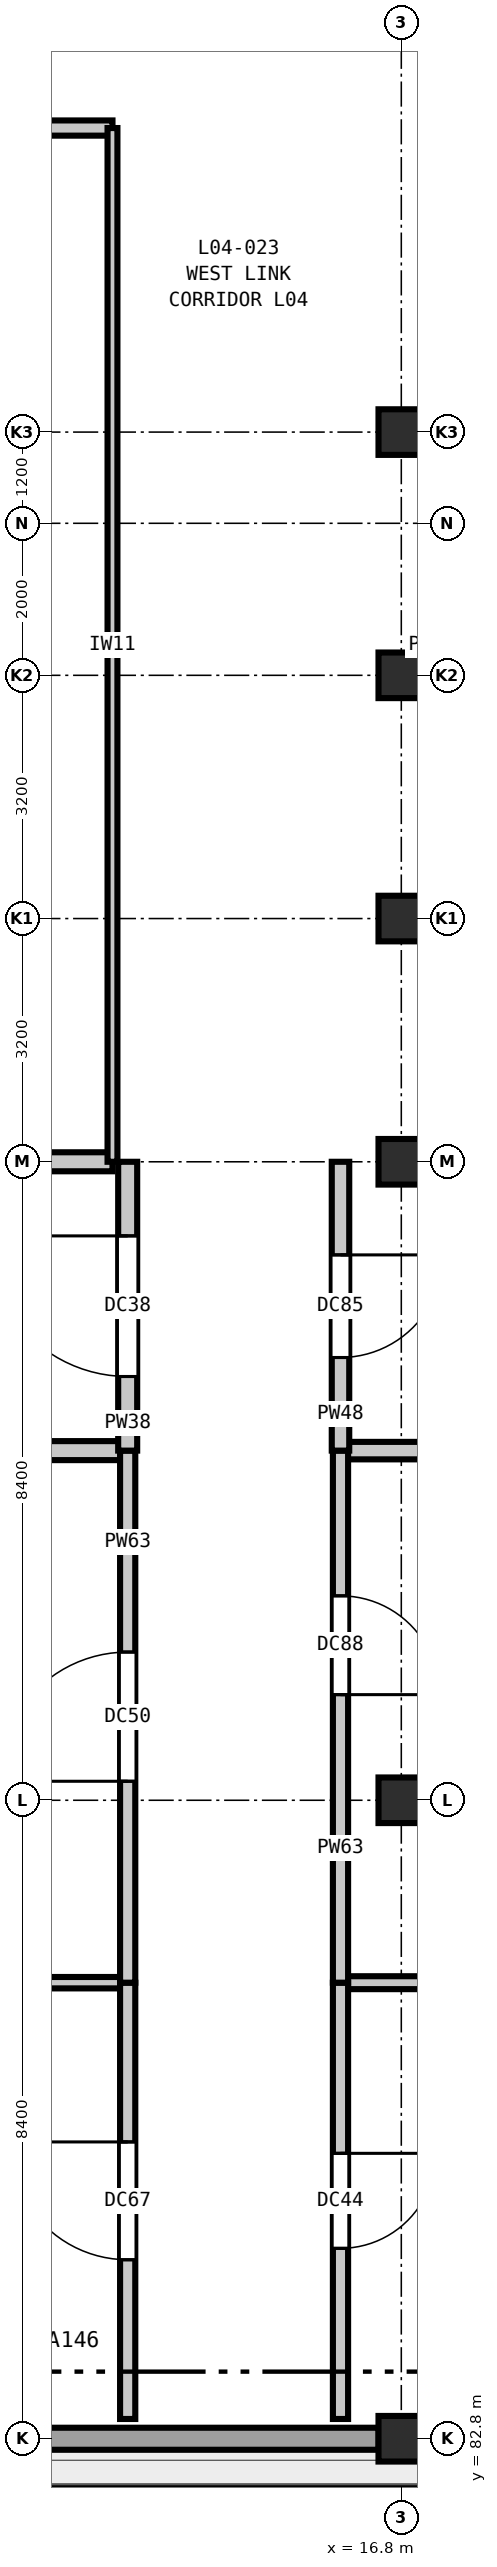
"""IFC4 building model, lengths in metres.
Left out: names, types, materials, properties, quantities, classifications, styles, units other than length and angle.
Written with IfcOpenShell. Run it as: python <this file> out.ifc"""

import sys

from ifc_helpers import new_model, si_unit, direction, frame, frame_2d, origin, origin_2d, place, context, subcontext, project, spatial, rectangle, extrude, element, fill, save


model = new_model("IFC4")
c1 = context("Model", 3, precision=1e-05, world=origin(), true_north=direction((0.0, 1.0)))
c2 = subcontext(c1, "Body", "Model", "MODEL_VIEW")
j1 = project(units=[si_unit("LENGTHUNIT", "METRE"), si_unit("PLANEANGLEUNIT", "RADIAN")], contexts=[c1])
p1 = place(None, origin())
s1 = spatial("IfcSite", under=j1, at=p1, CompositionType="ELEMENT")
p2 = place(p1, origin())
s2 = spatial("IfcBuilding", under=s1, at=p2, CompositionType="ELEMENT")
p3 = place(p2, frame((0.0, 0.0, 20.4)))
s3 = spatial("IfcBuildingStorey", under=s2, at=p3, CompositionType="ELEMENT", Elevation=20.4)
for number, where, z_axis, x_axis in (
    (1, (16.8, 82.8, 0.0), (0.0, 0.0, 1.0), (1.0, 0.0, 0.0)),
    (2, (16.8, 91.2, 0.0), (0.0, 0.0, 1.0), (1.0, 0.0, 0.0)),
    (3, (16.8, 99.6, 0.0), (0.0, 0.0, 1.0), (1.0, 0.0, 0.0)),
    (4, (16.8, 102.8, 0.0), (0.0, 0.0, 1.0), (1.0, 0.0, 0.0)),
    (5, (16.8, 106.0, 0.0), (0.0, 0.0, 1.0), (1.0, 0.0, 0.0)),
    (6, (16.8, 109.2, 0.0), (0.0, 0.0, 1.0), (1.0, 0.0, 0.0)),
):
    element("IfcColumn", number, at=place(p3, frame(where, z_axis=z_axis, x_axis=x_axis)), inside=s3, PredefinedType="COLUMN", context=c2, shape_type="SweptSolid", body=[
        extrude(rectangle(XDim=0.6, YDim=0.6, at=origin_2d()), origin(), (0.0, 0.0, 1.0), 4.2),
    ])
p4 = place(p3, frame((16.502, 82.8, 0.0), z_axis=(0.0, 0.0, 1.0), x_axis=(-1.0, 0.0, 0.0)))
e7 = element("IfcWall", 7, at=p4, inside=s3, PredefinedType="SOLIDWALL", context=c2, shape_type="SweptSolid", body=[
    extrude(rectangle(XDim=7.804, YDim=0.29, at=frame_2d((3.902, 0.0))), origin(), (0.0, 0.0, 1.0), 3.48),
])
p5 = place(p3, frame((0.26, 88.8, 0.0), z_axis=(0.0, 0.0, 1.0), x_axis=(1.0, 0.0, 0.0)))
e8 = element("IfcWall", 8, at=p5, inside=s3, PredefinedType="PARTITIONING", context=c2, shape_type="SweptSolid", body=[
    extrude(rectangle(XDim=12.94, YDim=0.15, at=frame_2d((6.47, 0.0))), origin(), (0.0, 0.0, 1.0), 3.82),
])
p6 = place(p3, frame((16.0, 88.8, 0.0), z_axis=(0.0, 0.0, 1.0), x_axis=(1.0, 0.0, 0.0)))
e9 = element("IfcWall", 9, at=p6, inside=s3, PredefinedType="PARTITIONING", context=c2, shape_type="SweptSolid", body=[
    extrude(rectangle(XDim=8.94, YDim=0.17, at=frame_2d((4.47, 0.0))), origin(), (0.0, 0.0, 1.0), 3.82),
])
p7 = place(p3, frame((0.26, 95.8, 0.0), z_axis=(0.0, 0.0, 1.0), x_axis=(1.0, 0.0, 0.0)))
e10 = element("IfcWall", 10, at=p7, inside=s3, PredefinedType="PARTITIONING", context=c2, shape_type="SweptSolid", body=[
    extrude(rectangle(XDim=12.94, YDim=0.25, at=frame_2d((6.47, 0.0))), origin(), (0.0, 0.0, 1.0), 3.82),
])
p8 = place(p3, frame((16.0, 95.8, 0.0), z_axis=(0.0, 0.0, 1.0), x_axis=(1.0, 0.0, 0.0)))
e11 = element("IfcWall", 11, at=p8, inside=s3, PredefinedType="PARTITIONING", context=c2, shape_type="SweptSolid", body=[
    extrude(rectangle(XDim=8.94, YDim=0.23, at=frame_2d((4.47, 0.0))), origin(), (0.0, 0.0, 1.0), 3.82),
])
p9 = place(p3, frame((8.715, 99.6, 0.0), z_axis=(0.0, 0.0, 1.0), x_axis=(1.0, 0.0, 0.0)))
e12 = element("IfcWall", 12, at=p9, inside=s3, PredefinedType="PARTITIONING", context=c2, shape_type="SweptSolid", body=[
    extrude(rectangle(XDim=4.285, YDim=0.25, at=frame_2d((2.143, 0.0))), origin(), (0.0, 0.0, 1.0), 3.585),
])
p10 = place(p3, frame((6.0, 113.2, 0.0), z_axis=(0.0, 0.0, 1.0), x_axis=(1.0, 0.0, 0.0)))
e13 = element("IfcWall", 13, at=p10, inside=s3, PredefinedType="PARTITIONING", context=c2, shape_type="SweptSolid", body=[
    extrude(rectangle(XDim=7.0, YDim=0.2, at=frame_2d((3.5, 0.0))), origin(), (0.0, 0.0, 1.0), 3.82),
])
p11 = place(p10, frame((2.775, 0.0, 0.0)))
e14 = element("IfcOpeningElement", 14, at=p11, cuts=e13, PredefinedType="OPENING", context=c2, shape_type="SweptSolid", body=[
    extrude(rectangle(XDim=1.45, YDim=2.25, at=frame_2d((0.725, 1.125))), frame((0.0, 0.11, 0.0), z_axis=(0.0, -1.0, 0.0), x_axis=(1.0, 0.0, 0.0)), (0.0, 0.0, 1.0), 0.22),
])
p12 = place(p3, frame((13.0, 99.6, 0.0), z_axis=(0.0, 0.0, 1.0), x_axis=(0.0, 1.0, 0.0)))
e15 = element("IfcWall", 15, at=p12, inside=s3, PredefinedType="PARTITIONING", context=c2, shape_type="SweptSolid", body=[
    extrude(rectangle(XDim=13.6, YDim=0.13, at=frame_2d((6.8, 0.0))), origin(), (0.0, 0.0, 1.0), 3.82),
])
p13 = place(p3, frame((13.2, 83.06, 0.0), z_axis=(0.0, 0.0, 1.0), x_axis=(0.0, 1.0, 0.0)))
e16 = element("IfcWall", 16, at=p13, inside=s3, PredefinedType="PARTITIONING", context=c2, shape_type="SweptSolid", body=[
    extrude(rectangle(XDim=5.74, YDim=0.2, at=frame_2d((2.87, 0.0))), origin(), (0.0, 0.0, 1.0), 3.82),
])
p14 = place(p13, frame((2.095, 0.0, 0.0)))
e17 = element("IfcOpeningElement", 17, at=p14, cuts=e16, PredefinedType="OPENING", context=c2, shape_type="SweptSolid", body=[
    extrude(rectangle(XDim=1.55, YDim=2.25, at=frame_2d((0.775, 1.125))), frame((0.0, 0.11, 0.0), z_axis=(0.0, -1.0, 0.0), x_axis=(1.0, 0.0, 0.0)), (0.0, 0.0, 1.0), 0.22),
])
p15 = place(p3, frame((13.2, 88.8, 0.0), z_axis=(0.0, 0.0, 1.0), x_axis=(0.0, 1.0, 0.0)))
e18 = element("IfcWall", 18, at=p15, inside=s3, PredefinedType="PARTITIONING", context=c2, shape_type="SweptSolid", body=[
    extrude(rectangle(XDim=7.0, YDim=0.2, at=frame_2d((3.5, 0.0))), origin(), (0.0, 0.0, 1.0), 3.82),
])
p16 = place(p15, frame((2.65, 0.0, 0.0)))
e19 = element("IfcOpeningElement", 19, at=p16, cuts=e18, PredefinedType="OPENING", context=c2, shape_type="SweptSolid", body=[
    extrude(rectangle(XDim=1.7, YDim=2.3, at=frame_2d((0.85, 1.15))), frame((0.0, 0.11, 0.0), z_axis=(0.0, -1.0, 0.0), x_axis=(1.0, 0.0, 0.0)), (0.0, 0.0, 1.0), 0.22),
])
p17 = place(p3, frame((13.2, 95.8, 0.0), z_axis=(0.0, 0.0, 1.0), x_axis=(0.0, 1.0, 0.0)))
e20 = element("IfcWall", 20, at=p17, inside=s3, PredefinedType="PARTITIONING", context=c2, shape_type="SweptSolid", body=[
    extrude(rectangle(XDim=3.8, YDim=0.25, at=frame_2d((1.9, 0.0))), origin(), (0.0, 0.0, 1.0), 3.82),
])
p18 = place(p17, frame((0.975, 0.0, 0.0)))
e21 = element("IfcOpeningElement", 21, at=p18, cuts=e20, PredefinedType="OPENING", context=c2, shape_type="SweptSolid", body=[
    extrude(rectangle(XDim=1.85, YDim=2.3, at=frame_2d((0.925, 1.15))), frame((0.0, 0.135, 0.0), z_axis=(0.0, -1.0, 0.0), x_axis=(1.0, 0.0, 0.0)), (0.0, 0.0, 1.0), 0.27),
])
p19 = place(p3, frame((16.0, 83.06, 0.0), z_axis=(0.0, 0.0, 1.0), x_axis=(0.0, 1.0, 0.0)))
e22 = element("IfcWall", 22, at=p19, inside=s3, PredefinedType="PARTITIONING", context=c2, shape_type="SweptSolid", body=[
    extrude(rectangle(XDim=5.74, YDim=0.2, at=frame_2d((2.87, 0.0))), origin(), (0.0, 0.0, 1.0), 3.82),
])
p20 = place(p19, frame((2.245, 0.0, 0.0)))
e23 = element("IfcOpeningElement", 23, at=p20, cuts=e22, PredefinedType="OPENING", context=c2, shape_type="SweptSolid", body=[
    extrude(rectangle(XDim=1.25, YDim=2.15, at=frame_2d((0.625, 1.075))), frame((0.0, 0.11, 0.0), z_axis=(0.0, -1.0, 0.0), x_axis=(1.0, 0.0, 0.0)), (0.0, 0.0, 1.0), 0.22),
])
p21 = place(p3, frame((16.0, 88.8, 0.0), z_axis=(0.0, 0.0, 1.0), x_axis=(0.0, 1.0, 0.0)))
e24 = element("IfcWall", 24, at=p21, inside=s3, PredefinedType="PARTITIONING", context=c2, shape_type="SweptSolid", body=[
    extrude(rectangle(XDim=7.0, YDim=0.2, at=frame_2d((3.5, 0.0))), origin(), (0.0, 0.0, 1.0), 3.82),
])
p22 = place(p21, frame((3.79, 0.0, 0.0)))
e25 = element("IfcOpeningElement", 25, at=p22, cuts=e24, PredefinedType="OPENING", context=c2, shape_type="SweptSolid", body=[
    extrude(rectangle(XDim=1.3, YDim=2.2, at=frame_2d((0.65, 1.1))), frame((0.0, 0.11, 0.0), z_axis=(0.0, -1.0, 0.0), x_axis=(1.0, 0.0, 0.0)), (0.0, 0.0, 1.0), 0.22),
])
p23 = place(p3, frame((16.0, 95.8, 0.0), z_axis=(0.0, 0.0, 1.0), x_axis=(0.0, 1.0, 0.0)))
e26 = element("IfcWall", 26, at=p23, inside=s3, PredefinedType="PARTITIONING", context=c2, shape_type="SweptSolid", body=[
    extrude(rectangle(XDim=3.8, YDim=0.23, at=frame_2d((1.9, 0.0))), origin(), (0.0, 0.0, 1.0), 3.82),
])
p24 = place(p23, frame((1.225, 0.0, 0.0)))
e27 = element("IfcOpeningElement", 27, at=p24, cuts=e26, PredefinedType="OPENING", context=c2, shape_type="SweptSolid", body=[
    extrude(rectangle(XDim=1.35, YDim=2.2, at=frame_2d((0.675, 1.1))), frame((0.0, 0.125, 0.0), z_axis=(0.0, -1.0, 0.0), x_axis=(1.0, 0.0, 0.0)), (0.0, 0.0, 1.0), 0.25),
])
p25 = place(p14, origin())
e28 = element("IfcDoor", 28, at=p25, inside=s3, OperationType="SINGLE_SWING_RIGHT", PredefinedType="DOOR", context=c2, shape_type="SweptSolid", body=[
    extrude(rectangle(XDim=1.55, YDim=2.25, at=frame_2d((0.775, 1.125))), frame((0.0, 0.025, 0.0), z_axis=(0.0, -1.0, 0.0), x_axis=(1.0, 0.0, 0.0)), (0.0, 0.0, 1.0), 0.05),
])
fill(e17, e28)
p26 = place(p16, origin())
e29 = element("IfcDoor", 29, at=p26, inside=s3, OperationType="SINGLE_SWING_LEFT", PredefinedType="DOOR", context=c2, shape_type="SweptSolid", body=[
    extrude(rectangle(XDim=1.7, YDim=2.3, at=frame_2d((0.85, 1.15))), frame((0.0, 0.025, 0.0), z_axis=(0.0, -1.0, 0.0), x_axis=(1.0, 0.0, 0.0)), (0.0, 0.0, 1.0), 0.05),
])
fill(e19, e29)
p27 = place(p18, origin())
e30 = element("IfcDoor", 30, at=p27, inside=s3, OperationType="SINGLE_SWING_RIGHT", PredefinedType="DOOR", context=c2, shape_type="SweptSolid", body=[
    extrude(rectangle(XDim=1.85, YDim=2.3, at=frame_2d((0.925, 1.15))), frame((0.0, 0.025, 0.0), z_axis=(0.0, -1.0, 0.0), x_axis=(1.0, 0.0, 0.0)), (0.0, 0.0, 1.0), 0.05),
])
fill(e21, e30)
p28 = place(p20, frame((1.25, 0.0, 0.0), z_axis=(0.0, 0.0, 1.0), x_axis=(-1.0, 0.0, 0.0)))
e31 = element("IfcDoor", 31, at=p28, inside=s3, OperationType="SINGLE_SWING_LEFT", PredefinedType="DOOR", context=c2, shape_type="SweptSolid", body=[
    extrude(rectangle(XDim=1.25, YDim=2.15, at=frame_2d((0.625, 1.075))), frame((0.0, 0.025, 0.0), z_axis=(0.0, -1.0, 0.0), x_axis=(1.0, 0.0, 0.0)), (0.0, 0.0, 1.0), 0.05),
])
fill(e23, e31)
p29 = place(p22, frame((1.3, 0.0, 0.0), z_axis=(0.0, 0.0, 1.0), x_axis=(-1.0, 0.0, 0.0)))
e32 = element("IfcDoor", 32, at=p29, inside=s3, OperationType="SINGLE_SWING_RIGHT", PredefinedType="DOOR", context=c2, shape_type="SweptSolid", body=[
    extrude(rectangle(XDim=1.3, YDim=2.2, at=frame_2d((0.65, 1.1))), frame((0.0, 0.025, 0.0), z_axis=(0.0, -1.0, 0.0), x_axis=(1.0, 0.0, 0.0)), (0.0, 0.0, 1.0), 0.05),
])
fill(e25, e32)
p30 = place(p24, frame((1.35, 0.0, 0.0), z_axis=(0.0, 0.0, 1.0), x_axis=(-1.0, 0.0, 0.0)))
e33 = element("IfcDoor", 33, at=p30, inside=s3, OperationType="SINGLE_SWING_LEFT", PredefinedType="DOOR", context=c2, shape_type="SweptSolid", body=[
    extrude(rectangle(XDim=1.35, YDim=2.2, at=frame_2d((0.675, 1.1))), frame((0.0, 0.025, 0.0), z_axis=(0.0, -1.0, 0.0), x_axis=(1.0, 0.0, 0.0)), (0.0, 0.0, 1.0), 0.05),
])
fill(e27, e33)
save(model, sys.argv[1])
